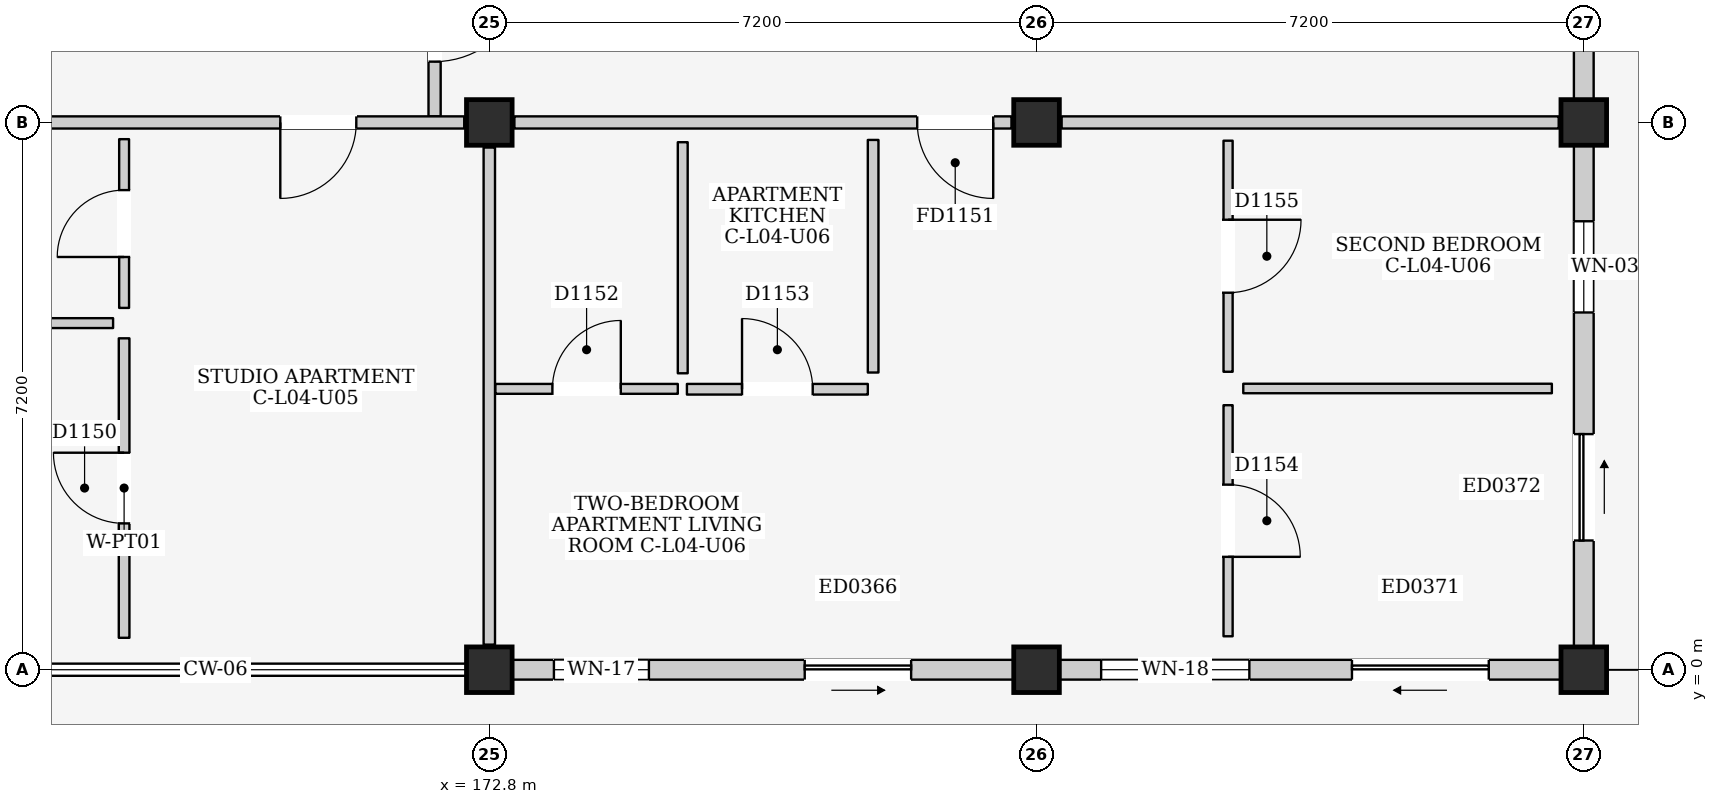
"""IFC4 building model, lengths in metres.
Left out: names, types, materials, properties, quantities, classifications, styles, units other than length and angle.
Written with IfcOpenShell. Run it as: python <this file> out.ifc"""

import sys

from ifc_helpers import new_model, si_unit, direction, frame, frame_2d, origin, origin_2d, place, context, subcontext, project, spatial, rectangle, extrude, element, fill, save


model = new_model("IFC4")
c1 = context("Model", 3, precision=1e-05, world=origin(), true_north=direction((0.0, 1.0)))
c2 = subcontext(c1, "Body", "Model", "MODEL_VIEW")
j1 = project(units=[si_unit("LENGTHUNIT", "METRE"), si_unit("PLANEANGLEUNIT", "RADIAN")], contexts=[c1])
p1 = place(None, origin())
s1 = spatial("IfcSite", under=j1, at=p1, CompositionType="ELEMENT")
p2 = place(p1, origin())
s2 = spatial("IfcBuilding", under=s1, at=p2, CompositionType="ELEMENT")
p3 = place(p2, frame((0.0, 0.0, 15.4)))
s3 = spatial("IfcBuildingStorey", under=s2, at=p3, CompositionType="ELEMENT", Elevation=15.4)
for number, where, z_axis, x_axis in (
    (1, (172.8, 0.0, 0.0), (0.0, 0.0, 1.0), (1.0, 0.0, 0.0)),
    (2, (172.8, 7.2, 0.0), (0.0, 0.0, 1.0), (1.0, 0.0, 0.0)),
    (3, (180.0, 0.0, 0.0), (0.0, 0.0, 1.0), (1.0, 0.0, 0.0)),
    (4, (180.0, 7.2, 0.0), (0.0, 0.0, 1.0), (1.0, 0.0, 0.0)),
    (5, (187.2, 0.0, 0.0), (0.0, 0.0, 1.0), (1.0, 0.0, 0.0)),
    (6, (187.2, 7.2, 0.0), (0.0, 0.0, 1.0), (1.0, 0.0, 0.0)),
):
    element("IfcColumn", number, at=place(p3, frame(where, z_axis=z_axis, x_axis=x_axis)), inside=s3, PredefinedType="COLUMN", context=c2, shape_type="SweptSolid", body=[
        extrude(rectangle(XDim=0.6, YDim=0.6, at=origin_2d()), origin(), (0.0, 0.0, 1.0), 3.2),
    ])
p4 = place(p3, frame((173.1, 0.0, 0.0), z_axis=(0.0, 0.0, 1.0), x_axis=(1.0, 0.0, 0.0)))
e7 = element("IfcWall", 7, at=p4, inside=s3, PredefinedType="ELEMENTEDWALL", context=c2, shape_type="SweptSolid", body=[
    extrude(rectangle(XDim=6.6, YDim=0.26, at=frame_2d((3.3, 0.0))), origin(), (0.0, 0.0, 1.0), 2.43),
])
p5 = place(p4, frame((3.85, 0.0, 0.0)))
e8 = element("IfcOpeningElement", 8, at=p5, cuts=e7, PredefinedType="OPENING", context=c2, shape_type="SweptSolid", body=[
    extrude(rectangle(XDim=1.4, YDim=2.1, at=frame_2d((0.7, 1.05))), frame((0.0, 0.145, 0.0), z_axis=(0.0, -1.0, 0.0), x_axis=(1.0, 0.0, 0.0)), (0.0, 0.0, 1.0), 0.29),
])
p6 = place(p4, frame((0.55, 0.0, 0.9)))
e9 = element("IfcOpeningElement", 9, at=p6, cuts=e7, PredefinedType="OPENING", context=c2, shape_type="SweptSolid", body=[
    extrude(rectangle(XDim=1.25, YDim=1.3, at=frame_2d((0.625, 0.65))), frame((0.0, 0.145, 0.0), z_axis=(0.0, -1.0, 0.0), x_axis=(1.0, 0.0, 0.0)), (0.0, 0.0, 1.0), 0.29),
])
p7 = place(p3, frame((180.3, 0.0, 0.0), z_axis=(0.0, 0.0, 1.0), x_axis=(1.0, 0.0, 0.0)))
e10 = element("IfcWall", 10, at=p7, inside=s3, PredefinedType="ELEMENTEDWALL", context=c2, shape_type="SweptSolid", body=[
    extrude(rectangle(XDim=6.6, YDim=0.26, at=frame_2d((3.3, 0.0))), origin(), (0.0, 0.0, 1.0), 2.43),
])
p8 = place(p7, frame((3.85, 0.0, 0.0)))
e11 = element("IfcOpeningElement", 11, at=p8, cuts=e10, PredefinedType="OPENING", context=c2, shape_type="SweptSolid", body=[
    extrude(rectangle(XDim=1.8, YDim=2.12, at=frame_2d((0.9, 1.06))), frame((0.0, 0.145, 0.0), z_axis=(0.0, -1.0, 0.0), x_axis=(1.0, 0.0, 0.0)), (0.0, 0.0, 1.0), 0.29),
])
p9 = place(p7, frame((0.55, 0.0, 0.76)))
e12 = element("IfcOpeningElement", 12, at=p9, cuts=e10, PredefinedType="OPENING", context=c2, shape_type="SweptSolid", body=[
    extrude(rectangle(XDim=1.95, YDim=1.55, at=frame_2d((0.975, 0.775))), frame((0.0, 0.145, 0.0), z_axis=(0.0, -1.0, 0.0), x_axis=(1.0, 0.0, 0.0)), (0.0, 0.0, 1.0), 0.29),
])
p10 = place(p3, frame((187.2, 0.3, 0.0), z_axis=(0.0, 0.0, 1.0), x_axis=(0.0, 1.0, 0.0)))
e13 = element("IfcWall", 13, at=p10, inside=s3, PredefinedType="ELEMENTEDWALL", context=c2, shape_type="SweptSolid", body=[
    extrude(rectangle(XDim=6.6, YDim=0.26, at=frame_2d((3.3, 0.0))), origin(), (0.0, 0.0, 1.0), 2.43),
])
p11 = place(p10, frame((1.4, 0.0, 0.0)))
e14 = element("IfcOpeningElement", 14, at=p11, cuts=e13, PredefinedType="OPENING", context=c2, shape_type="SweptSolid", body=[
    extrude(rectangle(XDim=1.4, YDim=2.1, at=frame_2d((0.7, 1.05))), frame((0.0, 0.145, 0.0), z_axis=(0.0, -1.0, 0.0), x_axis=(1.0, 0.0, 0.0)), (0.0, 0.0, 1.0), 0.29),
])
p12 = place(p10, frame((4.4, 0.0, 0.95)))
e15 = element("IfcOpeningElement", 15, at=p12, cuts=e13, PredefinedType="OPENING", context=c2, shape_type="SweptSolid", body=[
    extrude(rectangle(XDim=1.2, YDim=1.35, at=frame_2d((0.6, 0.675))), frame((0.0, 0.145, 0.0), z_axis=(0.0, -1.0, 0.0), x_axis=(1.0, 0.0, 0.0)), (0.0, 0.0, 1.0), 0.29),
])
p13 = place(p3, frame((187.2, 7.5, 0.0), z_axis=(0.0, 0.0, 1.0), x_axis=(0.0, 1.0, 0.0)))
e16 = element("IfcWall", 16, at=p13, inside=s3, PredefinedType="ELEMENTEDWALL", context=c2, shape_type="SweptSolid", body=[
    extrude(rectangle(XDim=6.6, YDim=0.26, at=frame_2d((3.3, 0.0))), origin(), (0.0, 0.0, 1.0), 2.43),
])
p14 = place(p13, frame((3.65, 0.0, 0.0)))
e17 = element("IfcOpeningElement", 17, at=p14, cuts=e16, PredefinedType="OPENING", context=c2, shape_type="SweptSolid", body=[
    extrude(rectangle(XDim=1.4, YDim=2.1, at=frame_2d((0.7, 1.05))), frame((0.0, 0.145, 0.0), z_axis=(0.0, -1.0, 0.0), x_axis=(1.0, 0.0, 0.0)), (0.0, 0.0, 1.0), 0.29),
])
p15 = place(p3, frame((172.08, 7.28, 0.0), z_axis=(0.0, 0.0, 1.0), x_axis=(0.0, 1.0, 0.0)))
e18 = element("IfcWall", 18, at=p15, inside=s3, PredefinedType="PARTITIONING", context=c2, shape_type="SweptSolid", body=[
    extrude(rectangle(XDim=4.32, YDim=0.16, at=frame_2d((2.16, 0.0))), origin(), (0.0, 0.0, 1.0), 2.95),
])
p16 = place(p15, frame((0.72, 0.0, 0.0)))
e19 = element("IfcOpeningElement", 19, at=p16, cuts=e18, PredefinedType="OPENING", context=c2, shape_type="SweptSolid", body=[
    extrude(rectangle(XDim=1.2, YDim=2.2, at=frame_2d((0.6, 1.1))), frame((0.0, 0.095, 0.0), z_axis=(0.0, -1.0, 0.0), x_axis=(1.0, 0.0, 0.0)), (0.0, 0.0, 1.0), 0.19),
])
p17 = place(p3, frame((165.93, 7.2, 0.0), z_axis=(0.0, 0.0, 1.0), x_axis=(1.0, 0.0, 0.0)))
e20 = element("IfcWall", 20, at=p17, inside=s3, PredefinedType="PARTITIONING", context=c2, shape_type="SweptSolid", body=[
    extrude(rectangle(XDim=6.54, YDim=0.16, at=frame_2d((3.27, 0.0))), origin(), (0.0, 0.0, 1.0), 2.335),
])
p18 = place(p17, frame((4.12, 0.0, 0.0)))
e21 = element("IfcOpeningElement", 21, at=p18, cuts=e20, PredefinedType="OPENING", context=c2, shape_type="SweptSolid", body=[
    extrude(rectangle(XDim=1.0, YDim=2.15, at=frame_2d((0.5, 1.075))), frame((0.0, 0.095, 0.0), z_axis=(0.0, -1.0, 0.0), x_axis=(1.0, 0.0, 0.0)), (0.0, 0.0, 1.0), 0.19),
])
p19 = place(p3, frame((172.8, 0.33, 0.0), z_axis=(0.0, 0.0, 1.0), x_axis=(0.0, 1.0, 0.0)))
e22 = element("IfcWall", 22, at=p19, inside=s3, PredefinedType="PARTITIONING", context=c2, shape_type="SweptSolid", body=[
    extrude(rectangle(XDim=6.54, YDim=0.15, at=frame_2d((3.27, 0.0))), origin(), (0.0, 0.0, 1.0), 2.385),
])
p20 = place(p3, frame((165.8, 4.56, 0.0), z_axis=(0.0, 0.0, 1.0), x_axis=(1.0, 0.0, 0.0)))
e23 = element("IfcWall", 23, at=p20, inside=s3, PredefinedType="PARTITIONING", context=c2, shape_type="SweptSolid", body=[
    extrude(rectangle(XDim=2.05, YDim=0.13, at=frame_2d((1.025, 0.0))), origin(), (0.0, 0.0, 1.0), 2.95),
])
p21 = place(p3, frame((167.995, 4.76, 0.0), z_axis=(0.0, 0.0, 1.0), x_axis=(0.0, 1.0, 0.0)))
e24 = element("IfcWall", 24, at=p21, inside=s3, PredefinedType="PARTITIONING", context=c2, shape_type="SweptSolid", body=[
    extrude(rectangle(XDim=2.22, YDim=0.13, at=frame_2d((1.11, 0.0))), origin(), (0.0, 0.0, 1.0), 2.95),
])
p22 = place(p21, frame((0.67, 0.0, 0.0)))
e25 = element("IfcOpeningElement", 25, at=p22, cuts=e24, PredefinedType="OPENING", context=c2, shape_type="SweptSolid", body=[
    extrude(rectangle(XDim=0.88, YDim=2.1, at=frame_2d((0.44, 1.05))), frame((0.0, 0.08, 0.0), z_axis=(0.0, -1.0, 0.0), x_axis=(1.0, 0.0, 0.0)), (0.0, 0.0, 1.0), 0.16),
])
p23 = place(p3, frame((167.995, 0.42, 0.0), z_axis=(0.0, 0.0, 1.0), x_axis=(0.0, 1.0, 0.0)))
e26 = element("IfcWall", 26, at=p23, inside=s3, PredefinedType="PARTITIONING", context=c2, shape_type="SweptSolid", body=[
    extrude(rectangle(XDim=3.94, YDim=0.14, at=frame_2d((1.97, 0.0))), origin(), (0.0, 0.0, 1.0), 2.95),
])
p24 = place(p23, frame((1.505, 0.0, 0.0)))
e27 = element("IfcOpeningElement", 27, at=p24, cuts=e26, PredefinedType="OPENING", context=c2, shape_type="SweptSolid", body=[
    extrude(rectangle(XDim=0.93, YDim=2.14, at=frame_2d((0.465, 1.07))), frame((0.0, 0.085, 0.0), z_axis=(0.0, -1.0, 0.0), x_axis=(1.0, 0.0, 0.0)), (0.0, 0.0, 1.0), 0.17),
])
p25 = place(p3, frame((173.13, 7.2, 0.0), z_axis=(0.0, 0.0, 1.0), x_axis=(1.0, 0.0, 0.0)))
e28 = element("IfcWall", 28, at=p25, inside=s3, PredefinedType="PARTITIONING", context=c2, shape_type="SweptSolid", body=[
    extrude(rectangle(XDim=6.54, YDim=0.16, at=frame_2d((3.27, 0.0))), origin(), (0.0, 0.0, 1.0), 2.335),
])
p26 = place(p25, frame((5.3, 0.0, 0.0)))
e29 = element("IfcOpeningElement", 29, at=p26, cuts=e28, PredefinedType="OPENING", context=c2, shape_type="SweptSolid", body=[
    extrude(rectangle(XDim=1.0, YDim=2.15, at=frame_2d((0.5, 1.075))), frame((0.0, 0.095, 0.0), z_axis=(0.0, -1.0, 0.0), x_axis=(1.0, 0.0, 0.0)), (0.0, 0.0, 1.0), 0.19),
])
p27 = place(p3, frame((180.33, 7.2, 0.0), z_axis=(0.0, 0.0, 1.0), x_axis=(1.0, 0.0, 0.0)))
e30 = element("IfcWall", 30, at=p27, inside=s3, PredefinedType="PARTITIONING", context=c2, shape_type="SweptSolid", body=[
    extrude(rectangle(XDim=6.54, YDim=0.16, at=frame_2d((3.27, 0.0))), origin(), (0.0, 0.0, 1.0), 2.335),
])
p28 = place(p3, frame((172.88, 3.695, 0.0), z_axis=(0.0, 0.0, 1.0), x_axis=(1.0, 0.0, 0.0)))
e31 = element("IfcWall", 31, at=p28, inside=s3, PredefinedType="PARTITIONING", context=c2, shape_type="SweptSolid", body=[
    extrude(rectangle(XDim=2.4, YDim=0.13, at=frame_2d((1.2, 0.0))), origin(), (0.0, 0.0, 1.0), 2.95),
])
p29 = place(p28, frame((0.75, 0.0, 0.0)))
e32 = element("IfcOpeningElement", 32, at=p29, cuts=e31, PredefinedType="OPENING", context=c2, shape_type="SweptSolid", body=[
    extrude(rectangle(XDim=0.9, YDim=2.1, at=frame_2d((0.45, 1.05))), frame((0.0, 0.08, 0.0), z_axis=(0.0, -1.0, 0.0), x_axis=(1.0, 0.0, 0.0)), (0.0, 0.0, 1.0), 0.16),
])
p30 = place(p3, frame((175.345, 3.9, 0.0), z_axis=(0.0, 0.0, 1.0), x_axis=(0.0, 1.0, 0.0)))
e33 = element("IfcWall", 33, at=p30, inside=s3, PredefinedType="PARTITIONING", context=c2, shape_type="SweptSolid", body=[
    extrude(rectangle(XDim=3.04, YDim=0.13, at=frame_2d((1.52, 0.0))), origin(), (0.0, 0.0, 1.0), 2.95),
])
p31 = place(p3, frame((175.4, 3.69, 0.0), z_axis=(0.0, 0.0, 1.0), x_axis=(1.0, 0.0, 0.0)))
e34 = element("IfcWall", 34, at=p31, inside=s3, PredefinedType="PARTITIONING", context=c2, shape_type="SweptSolid", body=[
    extrude(rectangle(XDim=2.38, YDim=0.14, at=frame_2d((1.19, 0.0))), origin(), (0.0, 0.0, 1.0), 2.95),
])
p32 = place(p31, frame((0.725, 0.0, 0.0)))
e35 = element("IfcOpeningElement", 35, at=p32, cuts=e34, PredefinedType="OPENING", context=c2, shape_type="SweptSolid", body=[
    extrude(rectangle(XDim=0.93, YDim=2.14, at=frame_2d((0.465, 1.07))), frame((0.0, 0.085, 0.0), z_axis=(0.0, -1.0, 0.0), x_axis=(1.0, 0.0, 0.0)), (0.0, 0.0, 1.0), 0.17),
])
p33 = place(p3, frame((177.85, 3.91, 0.0), z_axis=(0.0, 0.0, 1.0), x_axis=(0.0, 1.0, 0.0)))
e36 = element("IfcWall", 36, at=p33, inside=s3, PredefinedType="PARTITIONING", context=c2, shape_type="SweptSolid", body=[
    extrude(rectangle(XDim=3.06, YDim=0.14, at=frame_2d((1.53, 0.0))), origin(), (0.0, 0.0, 1.0), 2.95),
])
p34 = place(p3, frame((182.52, 0.44, 0.0), z_axis=(0.0, 0.0, 1.0), x_axis=(0.0, 1.0, 0.0)))
e37 = element("IfcWall", 37, at=p34, inside=s3, PredefinedType="PARTITIONING", context=c2, shape_type="SweptSolid", body=[
    extrude(rectangle(XDim=3.04, YDim=0.12, at=frame_2d((1.52, 0.0))), origin(), (0.0, 0.0, 1.0), 2.95),
])
p35 = place(p34, frame((1.045, 0.0, 0.0)))
e38 = element("IfcOpeningElement", 38, at=p35, cuts=e37, PredefinedType="OPENING", context=c2, shape_type="SweptSolid", body=[
    extrude(rectangle(XDim=0.95, YDim=2.15, at=frame_2d((0.475, 1.075))), frame((0.0, 0.075, 0.0), z_axis=(0.0, -1.0, 0.0), x_axis=(1.0, 0.0, 0.0)), (0.0, 0.0, 1.0), 0.15),
])
p36 = place(p3, frame((182.72, 3.7, 0.0), z_axis=(0.0, 0.0, 1.0), x_axis=(1.0, 0.0, 0.0)))
e39 = element("IfcWall", 39, at=p36, inside=s3, PredefinedType="PARTITIONING", context=c2, shape_type="SweptSolid", body=[
    extrude(rectangle(XDim=4.06, YDim=0.125, at=frame_2d((2.03, 0.0))), origin(), (0.0, 0.0, 1.0), 2.95),
])
p37 = place(p3, frame((182.52, 3.92, 0.0), z_axis=(0.0, 0.0, 1.0), x_axis=(0.0, 1.0, 0.0)))
e40 = element("IfcWall", 40, at=p37, inside=s3, PredefinedType="PARTITIONING", context=c2, shape_type="SweptSolid", body=[
    extrude(rectangle(XDim=3.04, YDim=0.12, at=frame_2d((1.52, 0.0))), origin(), (0.0, 0.0, 1.0), 2.95),
])
p38 = place(p37, frame((1.04, 0.0, 0.0)))
e41 = element("IfcOpeningElement", 41, at=p38, cuts=e40, PredefinedType="OPENING", context=c2, shape_type="SweptSolid", body=[
    extrude(rectangle(XDim=0.96, YDim=2.15, at=frame_2d((0.48, 1.075))), frame((0.0, 0.075, 0.0), z_axis=(0.0, -1.0, 0.0), x_axis=(1.0, 0.0, 0.0)), (0.0, 0.0, 1.0), 0.15),
])
p39 = place(p5, frame((1.4, 0.0, 0.0), z_axis=(0.0, 0.0, 1.0), x_axis=(-1.0, 0.0, 0.0)))
e42 = element("IfcDoor", 42, at=p39, inside=s3, OperationType="SLIDING_TO_RIGHT", PredefinedType="DOOR", context=c2, shape_type="SweptSolid", body=[
    extrude(rectangle(XDim=1.4, YDim=2.1, at=frame_2d((0.7, 1.05))), frame((0.0, 0.025, 0.0), z_axis=(0.0, -1.0, 0.0), x_axis=(1.0, 0.0, 0.0)), (0.0, 0.0, 1.0), 0.05),
])
fill(e8, e42)
p40 = place(p6, origin())
e43 = element("IfcWindow", 43, at=p40, inside=s3, PartitioningType="SINGLE_PANEL", PredefinedType="WINDOW", context=c2, shape_type="SweptSolid", body=[
    extrude(rectangle(XDim=1.25, YDim=1.3, at=frame_2d((0.625, 0.65))), frame((0.0, 0.03, 0.0), z_axis=(0.0, -1.0, 0.0), x_axis=(1.0, 0.0, 0.0)), (0.0, 0.0, 1.0), 0.06),
])
fill(e9, e43)
p41 = place(p8, frame((1.8, 0.0, 0.0), z_axis=(0.0, 0.0, 1.0), x_axis=(-1.0, 0.0, 0.0)))
e44 = element("IfcDoor", 44, at=p41, inside=s3, OperationType="SLIDING_TO_LEFT", PredefinedType="DOOR", context=c2, shape_type="SweptSolid", body=[
    extrude(rectangle(XDim=1.8, YDim=2.12, at=frame_2d((0.9, 1.06))), frame((0.0, 0.025, 0.0), z_axis=(0.0, -1.0, 0.0), x_axis=(1.0, 0.0, 0.0)), (0.0, 0.0, 1.0), 0.05),
])
fill(e11, e44)
p42 = place(p9, origin())
e45 = element("IfcWindow", 45, at=p42, inside=s3, PartitioningType="DOUBLE_PANEL_VERTICAL", PredefinedType="WINDOW", context=c2, shape_type="SweptSolid", body=[
    extrude(rectangle(XDim=1.95, YDim=1.55, at=frame_2d((0.975, 0.775))), frame((0.0, 0.03, 0.0), z_axis=(0.0, -1.0, 0.0), x_axis=(1.0, 0.0, 0.0)), (0.0, 0.0, 1.0), 0.06),
])
fill(e12, e45)
p43 = place(p11, frame((1.4, 0.0, 0.0), z_axis=(0.0, 0.0, 1.0), x_axis=(-1.0, 0.0, 0.0)))
e46 = element("IfcDoor", 46, at=p43, inside=s3, OperationType="SLIDING_TO_RIGHT", PredefinedType="DOOR", context=c2, shape_type="SweptSolid", body=[
    extrude(rectangle(XDim=1.4, YDim=2.1, at=frame_2d((0.7, 1.05))), frame((0.0, 0.025, 0.0), z_axis=(0.0, -1.0, 0.0), x_axis=(1.0, 0.0, 0.0)), (0.0, 0.0, 1.0), 0.05),
])
fill(e14, e46)
p44 = place(p12, origin())
e47 = element("IfcWindow", 47, at=p44, inside=s3, PartitioningType="SINGLE_PANEL", PredefinedType="WINDOW", context=c2, shape_type="SweptSolid", body=[
    extrude(rectangle(XDim=1.2, YDim=1.35, at=frame_2d((0.6, 0.675))), frame((0.0, 0.03, 0.0), z_axis=(0.0, -1.0, 0.0), x_axis=(1.0, 0.0, 0.0)), (0.0, 0.0, 1.0), 0.06),
])
fill(e15, e47)
p45 = place(p16, frame((1.2, 0.0, 0.0), z_axis=(0.0, 0.0, 1.0), x_axis=(-1.0, 0.0, 0.0)))
e48 = element("IfcDoor", 48, at=p45, inside=s3, OperationType="SINGLE_SWING_LEFT", PredefinedType="DOOR", context=c2, shape_type="SweptSolid", body=[
    extrude(rectangle(XDim=1.2, YDim=2.2, at=frame_2d((0.6, 1.1))), frame((0.0, 0.025, 0.0), z_axis=(0.0, -1.0, 0.0), x_axis=(1.0, 0.0, 0.0)), (0.0, 0.0, 1.0), 0.05),
])
fill(e19, e48)
p46 = place(p18, frame((1.0, 0.0, 0.0), z_axis=(0.0, 0.0, 1.0), x_axis=(-1.0, 0.0, 0.0)))
e49 = element("IfcDoor", 49, at=p46, inside=s3, OperationType="SINGLE_SWING_RIGHT", PredefinedType="DOOR", context=c2, shape_type="SweptSolid", body=[
    extrude(rectangle(XDim=1.0, YDim=2.15, at=frame_2d((0.5, 1.075))), frame((0.0, 0.025, 0.0), z_axis=(0.0, -1.0, 0.0), x_axis=(1.0, 0.0, 0.0)), (0.0, 0.0, 1.0), 0.05),
])
fill(e21, e49)
p47 = place(p22, origin())
e50 = element("IfcDoor", 50, at=p47, inside=s3, OperationType="SINGLE_SWING_LEFT", PredefinedType="DOOR", context=c2, shape_type="SweptSolid", body=[
    extrude(rectangle(XDim=0.88, YDim=2.1, at=frame_2d((0.44, 1.05))), frame((0.0, 0.025, 0.0), z_axis=(0.0, -1.0, 0.0), x_axis=(1.0, 0.0, 0.0)), (0.0, 0.0, 1.0), 0.05),
])
fill(e25, e50)
p48 = place(p24, origin())
e51 = element("IfcDoor", 51, at=p48, inside=s3, OperationType="SINGLE_SWING_RIGHT", PredefinedType="DOOR", context=c2, shape_type="SweptSolid", body=[
    extrude(rectangle(XDim=0.93, YDim=2.14, at=frame_2d((0.465, 1.07))), frame((0.0, 0.025, 0.0), z_axis=(0.0, -1.0, 0.0), x_axis=(1.0, 0.0, 0.0)), (0.0, 0.0, 1.0), 0.05),
])
fill(e27, e51)
p49 = place(p26, frame((1.0, 0.0, 0.0), z_axis=(0.0, 0.0, 1.0), x_axis=(-1.0, 0.0, 0.0)))
e52 = element("IfcDoor", 52, at=p49, inside=s3, OperationType="SINGLE_SWING_LEFT", PredefinedType="DOOR", context=c2, shape_type="SweptSolid", body=[
    extrude(rectangle(XDim=1.0, YDim=2.15, at=frame_2d((0.5, 1.075))), frame((0.0, 0.025, 0.0), z_axis=(0.0, -1.0, 0.0), x_axis=(1.0, 0.0, 0.0)), (0.0, 0.0, 1.0), 0.05),
])
fill(e29, e52)
p50 = place(p29, origin())
e53 = element("IfcDoor", 53, at=p50, inside=s3, OperationType="SINGLE_SWING_RIGHT", PredefinedType="DOOR", context=c2, shape_type="SweptSolid", body=[
    extrude(rectangle(XDim=0.9, YDim=2.1, at=frame_2d((0.45, 1.05))), frame((0.0, 0.025, 0.0), z_axis=(0.0, -1.0, 0.0), x_axis=(1.0, 0.0, 0.0)), (0.0, 0.0, 1.0), 0.05),
])
fill(e32, e53)
p51 = place(p32, origin())
e54 = element("IfcDoor", 54, at=p51, inside=s3, OperationType="SINGLE_SWING_LEFT", PredefinedType="DOOR", context=c2, shape_type="SweptSolid", body=[
    extrude(rectangle(XDim=0.93, YDim=2.14, at=frame_2d((0.465, 1.07))), frame((0.0, 0.025, 0.0), z_axis=(0.0, -1.0, 0.0), x_axis=(1.0, 0.0, 0.0)), (0.0, 0.0, 1.0), 0.05),
])
fill(e35, e54)
p52 = place(p35, frame((0.95, 0.0, 0.0), z_axis=(0.0, 0.0, 1.0), x_axis=(-1.0, 0.0, 0.0)))
e55 = element("IfcDoor", 55, at=p52, inside=s3, OperationType="SINGLE_SWING_RIGHT", PredefinedType="DOOR", context=c2, shape_type="SweptSolid", body=[
    extrude(rectangle(XDim=0.95, YDim=2.15, at=frame_2d((0.475, 1.075))), frame((0.0, 0.025, 0.0), z_axis=(0.0, -1.0, 0.0), x_axis=(1.0, 0.0, 0.0)), (0.0, 0.0, 1.0), 0.05),
])
fill(e38, e55)
p53 = place(p38, frame((0.96, 0.0, 0.0), z_axis=(0.0, 0.0, 1.0), x_axis=(-1.0, 0.0, 0.0)))
e56 = element("IfcDoor", 56, at=p53, inside=s3, OperationType="SINGLE_SWING_LEFT", PredefinedType="DOOR", context=c2, shape_type="SweptSolid", body=[
    extrude(rectangle(XDim=0.96, YDim=2.15, at=frame_2d((0.48, 1.075))), frame((0.0, 0.025, 0.0), z_axis=(0.0, -1.0, 0.0), x_axis=(1.0, 0.0, 0.0)), (0.0, 0.0, 1.0), 0.05),
])
fill(e41, e56)
save(model, sys.argv[1])
